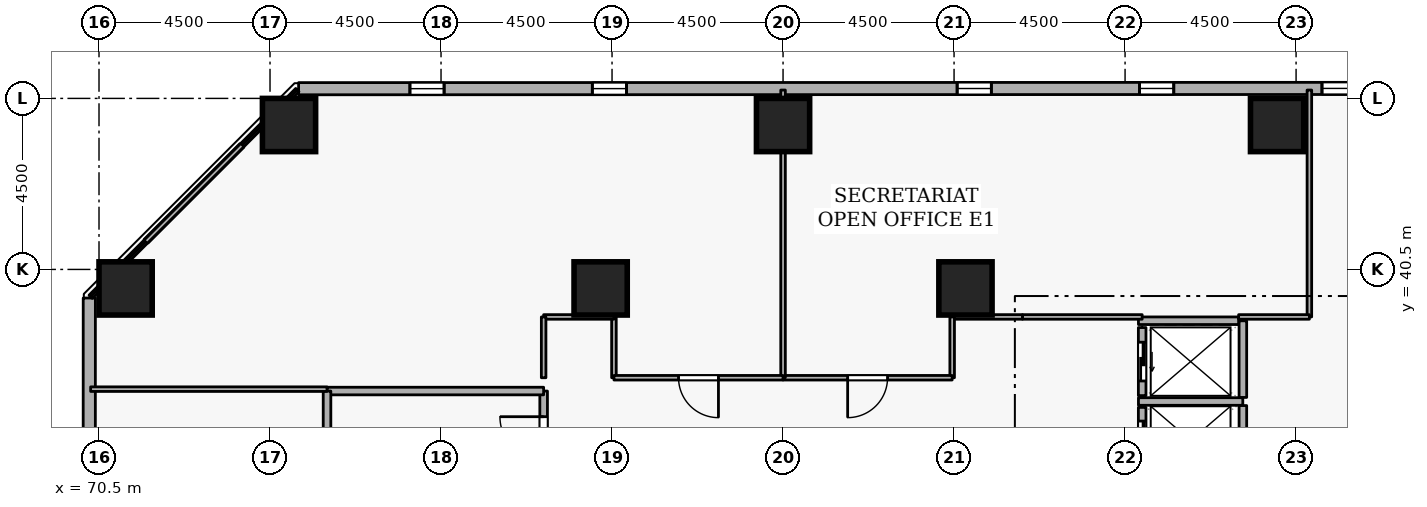
"""IFC4 building model, lengths in metres.
Left out: names, types, materials, properties, quantities, classifications, styles, units other than length and angle.
Written with IfcOpenShell. Run it as: python <this file> out.ifc"""

import sys

from ifc_helpers import new_model, si_unit, direction, frame, frame_2d, origin, origin_2d, place, context, subcontext, project, spatial, rectangle, extrude, element, fill, save


model = new_model("IFC4")
c1 = context("Model", 3, precision=1e-05, world=origin(), true_north=direction((0.0, 1.0)))
c2 = subcontext(c1, "Body", "Model", "MODEL_VIEW")
j1 = project(units=[si_unit("LENGTHUNIT", "METRE"), si_unit("PLANEANGLEUNIT", "RADIAN")], contexts=[c1])
p1 = place(None, origin())
s1 = spatial("IfcSite", under=j1, at=p1, CompositionType="ELEMENT")
p2 = place(p1, origin())
s2 = spatial("IfcBuilding", under=s1, at=p2, CompositionType="ELEMENT")
p3 = place(p2, frame((0.0, 0.0, 35.1)))
s3 = spatial("IfcBuildingStorey", under=s2, at=p3, CompositionType="ELEMENT", Elevation=35.1)
for number, where, z_axis, x_axis in (
    (1, (101.5, 44.3, 0.0), (0.0, 0.0, 1.0), (1.0, 0.0, 0.0)),
    (2, (88.5, 44.3, 0.0), (0.0, 0.0, 1.0), (1.0, 0.0, 0.0)),
    (3, (75.5, 44.3, 0.0), (0.0, 0.0, 1.0), (1.0, 0.0, 0.0)),
    (4, (71.2, 40.0, 0.0), (0.0, 0.0, 1.0), (1.0, 0.0, 0.0)),
    (5, (93.3, 40.0, 0.0), (0.0, 0.0, 1.0), (1.0, 0.0, 0.0)),
    (6, (83.7, 40.0, 0.0), (0.0, 0.0, 1.0), (1.0, 0.0, 0.0)),
):
    element("IfcColumn", number, at=place(p3, frame(where, z_axis=z_axis, x_axis=x_axis)), inside=s3, PredefinedType="COLUMN", context=c2, shape_type="SweptSolid", body=[
        extrude(rectangle(XDim=1.4, YDim=1.4, at=origin_2d()), origin(), (0.0, 0.0, 1.0), 3.6),
    ])
p4 = place(p3, frame((110.181, 45.265, 0.0), z_axis=(0.0, 0.0, 1.0), x_axis=(-0.999999961759, -0.000276554545, 0.0)))
e7 = element("IfcWall", 7, at=p4, inside=s3, PredefinedType="STANDARD", context=c2, shape_type="SweptSolid", body=[
    extrude(rectangle(XDim=34.429, YDim=0.32, at=frame_2d((17.214, 0.0))), origin(), (0.0, 0.0, 1.0), 2.7),
])
p5 = place(p4, frame((1.8, 0.0, 0.72)))
e8 = element("IfcOpeningElement", 8, at=p5, cuts=e7, PredefinedType="OPENING", context=c2, shape_type="SweptSolid", body=[
    extrude(rectangle(XDim=0.9, YDim=1.75, at=frame_2d((0.45, 0.875))), frame((0.0, 0.17, 0.0), z_axis=(0.0, -1.0, 0.0), x_axis=(1.0, 0.0, 0.0)), (0.0, 0.0, 1.0), 0.34),
])
p6 = place(p4, frame((6.6, 0.0, 0.72)))
e9 = element("IfcOpeningElement", 9, at=p6, cuts=e7, PredefinedType="OPENING", context=c2, shape_type="SweptSolid", body=[
    extrude(rectangle(XDim=0.9, YDim=1.75, at=frame_2d((0.45, 0.875))), frame((0.0, 0.17, 0.0), z_axis=(0.0, -1.0, 0.0), x_axis=(1.0, 0.0, 0.0)), (0.0, 0.0, 1.0), 0.34),
])
p7 = place(p4, frame((11.4, 0.0, 0.72)))
e10 = element("IfcOpeningElement", 10, at=p7, cuts=e7, PredefinedType="OPENING", context=c2, shape_type="SweptSolid", body=[
    extrude(rectangle(XDim=0.9, YDim=1.75, at=frame_2d((0.45, 0.875))), frame((0.0, 0.17, 0.0), z_axis=(0.0, -1.0, 0.0), x_axis=(1.0, 0.0, 0.0)), (0.0, 0.0, 1.0), 0.34),
])
p8 = place(p4, frame((16.2, 0.0, 0.72)))
e11 = element("IfcOpeningElement", 11, at=p8, cuts=e7, PredefinedType="OPENING", context=c2, shape_type="SweptSolid", body=[
    extrude(rectangle(XDim=0.9, YDim=1.75, at=frame_2d((0.45, 0.875))), frame((0.0, 0.17, 0.0), z_axis=(0.0, -1.0, 0.0), x_axis=(1.0, 0.0, 0.0)), (0.0, 0.0, 1.0), 0.34),
])
p9 = place(p4, frame((25.8, 0.0, 0.72)))
e12 = element("IfcOpeningElement", 12, at=p9, cuts=e7, PredefinedType="OPENING", context=c2, shape_type="SweptSolid", body=[
    extrude(rectangle(XDim=0.9, YDim=1.75, at=frame_2d((0.45, 0.875))), frame((0.0, 0.17, 0.0), z_axis=(0.0, -1.0, 0.0), x_axis=(1.0, 0.0, 0.0)), (0.0, 0.0, 1.0), 0.34),
])
p10 = place(p4, frame((30.6, 0.0, 0.72)))
e13 = element("IfcOpeningElement", 13, at=p10, cuts=e7, PredefinedType="OPENING", context=c2, shape_type="SweptSolid", body=[
    extrude(rectangle(XDim=0.9, YDim=1.75, at=frame_2d((0.45, 0.875))), frame((0.0, 0.17, 0.0), z_axis=(0.0, -1.0, 0.0), x_axis=(1.0, 0.0, 0.0)), (0.0, 0.0, 1.0), 0.34),
])
p11 = place(p3, frame((70.245, 39.748, 0.0), z_axis=(0.0, 0.0, 1.0), x_axis=(-0.000276554545, -0.999999961759, 0.0)))
e14 = element("IfcWall", 14, at=p11, inside=s3, PredefinedType="STANDARD", context=c2, shape_type="SweptSolid", body=[
    extrude(rectangle(XDim=34.429, YDim=0.32, at=frame_2d((17.214, 0.0))), origin(), (0.0, 0.0, 1.0), 2.7),
])
p12 = place(p11, frame((6.6, 0.0, 0.72)))
e15 = element("IfcOpeningElement", 15, at=p12, cuts=e14, PredefinedType="OPENING", context=c2, shape_type="SweptSolid", body=[
    extrude(rectangle(XDim=0.9, YDim=1.75, at=frame_2d((0.45, 0.875))), frame((0.0, 0.17, 0.0), z_axis=(0.0, -1.0, 0.0), x_axis=(1.0, 0.0, 0.0)), (0.0, 0.0, 1.0), 0.34),
])
p13 = place(p11, frame((16.2, 0.0, 0.72)))
e16 = element("IfcOpeningElement", 16, at=p13, cuts=e14, PredefinedType="OPENING", context=c2, shape_type="SweptSolid", body=[
    extrude(rectangle(XDim=0.9, YDim=1.75, at=frame_2d((0.45, 0.875))), frame((0.0, 0.17, 0.0), z_axis=(0.0, -1.0, 0.0), x_axis=(1.0, 0.0, 0.0)), (0.0, 0.0, 1.0), 0.34),
])
p14 = place(p11, frame((21.0, 0.0, 0.72)))
e17 = element("IfcOpeningElement", 17, at=p14, cuts=e14, PredefinedType="OPENING", context=c2, shape_type="SweptSolid", body=[
    extrude(rectangle(XDim=0.9, YDim=1.75, at=frame_2d((0.45, 0.875))), frame((0.0, 0.17, 0.0), z_axis=(0.0, -1.0, 0.0), x_axis=(1.0, 0.0, 0.0)), (0.0, 0.0, 1.0), 0.34),
])
p15 = place(p11, frame((30.6, 0.0, 0.72)))
e18 = element("IfcOpeningElement", 18, at=p15, cuts=e14, PredefinedType="OPENING", context=c2, shape_type="SweptSolid", body=[
    extrude(rectangle(XDim=0.9, YDim=1.75, at=frame_2d((0.45, 0.875))), frame((0.0, 0.17, 0.0), z_axis=(0.0, -1.0, 0.0), x_axis=(1.0, 0.0, 0.0)), (0.0, 0.0, 1.0), 0.34),
])
p16 = place(p3, frame((97.95, 36.87, 0.0), z_axis=(0.0, 0.0, 1.0), x_axis=(0.0, -1.0, 0.0)))
e19 = element("IfcWall", 19, at=p16, inside=s3, PredefinedType="STANDARD", context=c2, shape_type="SweptSolid", body=[
    extrude(rectangle(XDim=1.74, YDim=0.2, at=frame_2d((0.87, 0.0))), origin(), (0.0, 0.0, 1.0), 3.34),
])
p17 = place(p16, frame((0.36, 0.0, 0.0)))
e20 = element("IfcOpeningElement", 20, at=p17, cuts=e19, PredefinedType="OPENING", context=c2, shape_type="SweptSolid", body=[
    extrude(rectangle(XDim=1.02, YDim=2.06, at=frame_2d((0.51, 1.03))), frame((0.0, 0.11, 0.0), z_axis=(0.0, -1.0, 0.0), x_axis=(1.0, 0.0, 0.0)), (0.0, 0.0, 1.0), 0.22),
])
p18 = place(p3, frame((97.95, 38.97, 0.0), z_axis=(0.0, 0.0, 1.0), x_axis=(0.0, -1.0, 0.0)))
e21 = element("IfcWall", 21, at=p18, inside=s3, PredefinedType="STANDARD", context=c2, shape_type="SweptSolid", body=[
    extrude(rectangle(XDim=1.79, YDim=0.2, at=frame_2d((0.895, 0.0))), origin(), (0.0, 0.0, 1.0), 3.34),
])
p19 = place(p18, frame((0.385, 0.0, 0.0)))
e22 = element("IfcOpeningElement", 22, at=p19, cuts=e21, PredefinedType="OPENING", context=c2, shape_type="SweptSolid", body=[
    extrude(rectangle(XDim=1.02, YDim=2.06, at=frame_2d((0.51, 1.03))), frame((0.0, 0.11, 0.0), z_axis=(0.0, -1.0, 0.0), x_axis=(1.0, 0.0, 0.0)), (0.0, 0.0, 1.0), 0.22),
])
p20 = place(p3, frame((97.852, 37.025, 0.0), z_axis=(0.0, 0.0, 1.0), x_axis=(1.0, 0.0, 0.0)))
e23 = element("IfcWall", 23, at=p20, inside=s3, PredefinedType="STANDARD", context=c2, shape_type="SweptSolid", body=[
    extrude(rectangle(XDim=2.746, YDim=0.2, at=frame_2d((1.373, 0.0))), origin(), (0.0, 0.0, 1.0), 3.34),
])
p21 = place(p3, frame((100.6, 35.062, 0.0), z_axis=(0.0, 0.0, 1.0), x_axis=(0.0, 1.0, 0.0)))
e24 = element("IfcWall", 24, at=p21, inside=s3, PredefinedType="STANDARD", context=c2, shape_type="SweptSolid", body=[
    extrude(rectangle(XDim=1.856, YDim=0.2, at=frame_2d((0.928, 0.0))), origin(), (0.0, 0.0, 1.0), 3.34),
])
p22 = place(p3, frame((100.6, 37.132, 0.0), z_axis=(0.0, 0.0, 1.0), x_axis=(0.0, 1.0, 0.0)))
e25 = element("IfcWall", 25, at=p22, inside=s3, PredefinedType="STANDARD", context=c2, shape_type="SweptSolid", body=[
    extrude(rectangle(XDim=2.016, YDim=0.2, at=frame_2d((1.008, 0.0))), origin(), (0.0, 0.0, 1.0), 3.34),
])
p23 = place(p3, frame((97.852, 39.15, 0.0), z_axis=(0.0, 0.0, 1.0), x_axis=(1.0, 0.0, 0.0)))
e26 = element("IfcWall", 26, at=p23, inside=s3, PredefinedType="STANDARD", context=c2, shape_type="SweptSolid", body=[
    extrude(rectangle(XDim=2.636, YDim=0.2, at=frame_2d((1.318, 0.0))), origin(), (0.0, 0.0, 1.0), 3.34),
])
p24 = place(p3, frame((82.2, 34.8, 0.0), z_axis=(0.0, 0.0, 1.0), x_axis=(0.0, 1.0, 0.0)))
e27 = element("IfcWall", 27, at=p24, inside=s3, PredefinedType="STANDARD", context=c2, shape_type="SweptSolid", body=[
    extrude(rectangle(XDim=2.5, YDim=0.2, at=frame_2d((1.25, 0.0))), origin(), (0.0, 0.0, 1.0), 3.34),
])
p25 = place(p24, frame((0.675, 0.0, 0.0)))
e28 = element("IfcOpeningElement", 28, at=p25, cuts=e27, PredefinedType="OPENING", context=c2, shape_type="SweptSolid", body=[
    extrude(rectangle(XDim=1.15, YDim=2.1, at=frame_2d((0.575, 1.05))), frame((0.0, 0.11, 0.0), z_axis=(0.0, -1.0, 0.0), x_axis=(1.0, 0.0, 0.0)), (0.0, 0.0, 1.0), 0.22),
])
p26 = place(p3, frame((82.2, 37.3, 0.0), z_axis=(0.0, 0.0, 1.0), x_axis=(-1.0, 0.0, 0.0)))
e29 = element("IfcWall", 29, at=p26, inside=s3, PredefinedType="STANDARD", context=c2, shape_type="SweptSolid", body=[
    extrude(rectangle(XDim=5.7, YDim=0.2, at=frame_2d((2.85, 0.0))), origin(), (0.0, 0.0, 1.0), 3.34),
])
p27 = place(p3, frame((76.5, 37.3, 0.0), z_axis=(0.0, 0.0, 1.0), x_axis=(0.0, -1.0, 0.0)))
e30 = element("IfcWall", 30, at=p27, inside=s3, PredefinedType="STANDARD", context=c2, shape_type="SweptSolid", body=[
    extrude(rectangle(XDim=2.5, YDim=0.2, at=frame_2d((1.25, 0.0))), origin(), (0.0, 0.0, 1.0), 3.34),
])
p28 = place(p3, frame((97.95, 39.25, 0.0), z_axis=(0.0, 0.0, 1.0), x_axis=(-1.0, 0.0, 0.0)))
e31 = element("IfcWall", 31, at=p28, inside=s3, PredefinedType="PARTITIONING", context=c2, shape_type="SweptSolid", body=[
    extrude(rectangle(XDim=3.15, YDim=0.12, at=frame_2d((1.575, 0.0))), origin(), (0.0, 0.0, 1.0), 3.34),
])
p29 = place(p3, frame((94.8, 39.25, 0.0), z_axis=(0.0, 0.0, 1.0), x_axis=(-1.0, 0.0, 0.0)))
e32 = element("IfcWall", 32, at=p29, inside=s3, PredefinedType="PARTITIONING", context=c2, shape_type="SweptSolid", body=[
    extrude(rectangle(XDim=1.85, YDim=0.12, at=frame_2d((0.925, 0.0))), origin(), (0.0, 0.0, 1.0), 3.34),
])
p30 = place(p3, frame((92.95, 39.25, 0.0), z_axis=(0.0, 0.0, 1.0), x_axis=(0.0, -1.0, 0.0)))
e33 = element("IfcWall", 33, at=p30, inside=s3, PredefinedType="PARTITIONING", context=c2, shape_type="SweptSolid", body=[
    extrude(rectangle(XDim=1.6, YDim=0.12, at=frame_2d((0.8, 0.0))), origin(), (0.0, 0.0, 1.0), 3.34),
])
p31 = place(p3, frame((92.95, 37.65, 0.0), z_axis=(0.0, 0.0, 1.0), x_axis=(-1.0, 0.0, 0.0)))
e34 = element("IfcWall", 34, at=p31, inside=s3, PredefinedType="PARTITIONING", context=c2, shape_type="SweptSolid", body=[
    extrude(rectangle(XDim=4.45, YDim=0.12, at=frame_2d((2.225, 0.0))), origin(), (0.0, 0.0, 1.0), 3.34),
])
p32 = place(p31, frame((1.7, 0.0, 0.0)))
e35 = element("IfcOpeningElement", 35, at=p32, cuts=e34, PredefinedType="OPENING", context=c2, shape_type="SweptSolid", body=[
    extrude(rectangle(XDim=1.05, YDim=2.1, at=frame_2d((0.525, 1.05))), frame((0.0, 0.07, 0.0), z_axis=(0.0, -1.0, 0.0), x_axis=(1.0, 0.0, 0.0)), (0.0, 0.0, 1.0), 0.14),
])
p33 = place(p3, frame((88.5, 37.65, 0.0), z_axis=(0.0, 0.0, 1.0), x_axis=(0.0, 1.0, 0.0)))
e36 = element("IfcWall", 36, at=p33, inside=s3, PredefinedType="PARTITIONING", context=c2, shape_type="SweptSolid", body=[
    extrude(rectangle(XDim=7.57, YDim=0.12, at=frame_2d((3.785, 0.0))), origin(), (0.0, 0.0, 1.0), 2.878),
])
p34 = place(p3, frame((102.35, 45.22, 0.0), z_axis=(0.0, 0.0, 1.0), x_axis=(0.0, -1.0, 0.0)))
e37 = element("IfcWall", 37, at=p34, inside=s3, PredefinedType="PARTITIONING", context=c2, shape_type="SweptSolid", body=[
    extrude(rectangle(XDim=5.97, YDim=0.12, at=frame_2d((2.985, 0.0))), origin(), (0.0, 0.0, 1.0), 3.34),
])
p35 = place(p3, frame((102.35, 39.25, 0.0), z_axis=(0.0, 0.0, 1.0), x_axis=(-1.0, 0.0, 0.0)))
e38 = element("IfcWall", 38, at=p35, inside=s3, PredefinedType="PARTITIONING", context=c2, shape_type="SweptSolid", body=[
    extrude(rectangle(XDim=1.862, YDim=0.12, at=frame_2d((0.931, 0.0))), origin(), (0.0, 0.0, 1.0), 3.34),
])
p36 = place(p3, frame((84.05, 37.65, 0.0), z_axis=(0.0, 0.0, 1.0), x_axis=(0.0, 1.0, 0.0)))
e39 = element("IfcWall", 39, at=p36, inside=s3, PredefinedType="PARTITIONING", context=c2, shape_type="SweptSolid", body=[
    extrude(rectangle(XDim=1.6, YDim=0.12, at=frame_2d((0.8, 0.0))), origin(), (0.0, 0.0, 1.0), 3.34),
])
p37 = place(p3, frame((84.05, 39.25, 0.0), z_axis=(0.0, 0.0, 1.0), x_axis=(-1.0, 0.0, 0.0)))
e40 = element("IfcWall", 40, at=p37, inside=s3, PredefinedType="PARTITIONING", context=c2, shape_type="SweptSolid", body=[
    extrude(rectangle(XDim=1.85, YDim=0.12, at=frame_2d((0.925, 0.0))), origin(), (0.0, 0.0, 1.0), 3.34),
])
p38 = place(p3, frame((82.2, 39.25, 0.0), z_axis=(0.0, 0.0, 1.0), x_axis=(0.0, -1.0, 0.0)))
e41 = element("IfcWall", 41, at=p38, inside=s3, PredefinedType="PARTITIONING", context=c2, shape_type="SweptSolid", body=[
    extrude(rectangle(XDim=1.6, YDim=0.12, at=frame_2d((0.8, 0.0))), origin(), (0.0, 0.0, 1.0), 3.34),
])
p39 = place(p3, frame((76.5, 37.35, 0.0), z_axis=(0.0, 0.0, 1.0), x_axis=(-1.0, 0.0, 0.0)))
e42 = element("IfcWall", 42, at=p39, inside=s3, PredefinedType="PARTITIONING", context=c2, shape_type="SweptSolid", body=[
    extrude(rectangle(XDim=6.22, YDim=0.12, at=frame_2d((3.11, 0.0))), origin(), (0.0, 0.0, 1.0), 3.34),
])
p40 = place(p3, frame((70.28, 39.781, 0.0), z_axis=(0.0, 0.0, 1.0), x_axis=(0.707106781187, 0.707106781187, 0.0)))
e43 = element("IfcWall", 43, at=p40, inside=s3, PredefinedType="PARTITIONING", context=c2, shape_type="SweptSolid", body=[
    extrude(rectangle(XDim=7.693, YDim=0.12, at=frame_2d((3.846, 0.0))), origin(), (0.0, 0.0, 1.0), 3.34),
])
p41 = place(p3, frame((88.5, 37.65, 0.0), z_axis=(0.0, 0.0, 1.0), x_axis=(-1.0, 0.0, 0.0)))
e44 = element("IfcWall", 44, at=p41, inside=s3, PredefinedType="PARTITIONING", context=c2, shape_type="SweptSolid", body=[
    extrude(rectangle(XDim=4.45, YDim=0.12, at=frame_2d((2.225, 0.0))), origin(), (0.0, 0.0, 1.0), 3.34),
])
p42 = place(p41, frame((1.7, 0.0, 0.0)))
e45 = element("IfcOpeningElement", 45, at=p42, cuts=e44, PredefinedType="OPENING", context=c2, shape_type="SweptSolid", body=[
    extrude(rectangle(XDim=1.05, YDim=2.1, at=frame_2d((0.525, 1.05))), frame((0.0, 0.07, 0.0), z_axis=(0.0, -1.0, 0.0), x_axis=(1.0, 0.0, 0.0)), (0.0, 0.0, 1.0), 0.14),
])
p43 = place(p6, origin())
e46 = element("IfcWindow", 46, at=p43, inside=s3, PartitioningType="SINGLE_PANEL", PredefinedType="WINDOW", context=c2, shape_type="SweptSolid", body=[
    extrude(rectangle(XDim=0.9, YDim=1.75, at=frame_2d((0.45, 0.875))), frame((0.0, 0.03, 0.0), z_axis=(0.0, -1.0, 0.0), x_axis=(1.0, 0.0, 0.0)), (0.0, 0.0, 1.0), 0.06),
])
fill(e9, e46)
p44 = place(p7, origin())
e47 = element("IfcWindow", 47, at=p44, inside=s3, PartitioningType="SINGLE_PANEL", PredefinedType="WINDOW", context=c2, shape_type="SweptSolid", body=[
    extrude(rectangle(XDim=0.9, YDim=1.75, at=frame_2d((0.45, 0.875))), frame((0.0, 0.03, 0.0), z_axis=(0.0, -1.0, 0.0), x_axis=(1.0, 0.0, 0.0)), (0.0, 0.0, 1.0), 0.06),
])
fill(e10, e47)
p45 = place(p8, origin())
e48 = element("IfcWindow", 48, at=p45, inside=s3, PartitioningType="SINGLE_PANEL", PredefinedType="WINDOW", context=c2, shape_type="SweptSolid", body=[
    extrude(rectangle(XDim=0.9, YDim=1.75, at=frame_2d((0.45, 0.875))), frame((0.0, 0.03, 0.0), z_axis=(0.0, -1.0, 0.0), x_axis=(1.0, 0.0, 0.0)), (0.0, 0.0, 1.0), 0.06),
])
fill(e11, e48)
p46 = place(p9, origin())
e49 = element("IfcWindow", 49, at=p46, inside=s3, PartitioningType="SINGLE_PANEL", PredefinedType="WINDOW", context=c2, shape_type="SweptSolid", body=[
    extrude(rectangle(XDim=0.9, YDim=1.75, at=frame_2d((0.45, 0.875))), frame((0.0, 0.03, 0.0), z_axis=(0.0, -1.0, 0.0), x_axis=(1.0, 0.0, 0.0)), (0.0, 0.0, 1.0), 0.06),
])
fill(e12, e49)
p47 = place(p10, origin())
e50 = element("IfcWindow", 50, at=p47, inside=s3, PartitioningType="SINGLE_PANEL", PredefinedType="WINDOW", context=c2, shape_type="SweptSolid", body=[
    extrude(rectangle(XDim=0.9, YDim=1.75, at=frame_2d((0.45, 0.875))), frame((0.0, 0.03, 0.0), z_axis=(0.0, -1.0, 0.0), x_axis=(1.0, 0.0, 0.0)), (0.0, 0.0, 1.0), 0.06),
])
fill(e13, e50)
p48 = place(p17, origin())
e51 = element("IfcDoor", 51, at=p48, inside=s3, OperationType="SLIDING_TO_LEFT", PredefinedType="DOOR", context=c2, shape_type="SweptSolid", body=[
    extrude(rectangle(XDim=1.02, YDim=2.06, at=frame_2d((0.51, 1.03))), frame((0.0, 0.025, 0.0), z_axis=(0.0, -1.0, 0.0), x_axis=(1.0, 0.0, 0.0)), (0.0, 0.0, 1.0), 0.05),
])
fill(e20, e51)
p49 = place(p19, origin())
e52 = element("IfcDoor", 52, at=p49, inside=s3, OperationType="SLIDING_TO_LEFT", PredefinedType="DOOR", context=c2, shape_type="SweptSolid", body=[
    extrude(rectangle(XDim=1.02, YDim=2.06, at=frame_2d((0.51, 1.03))), frame((0.0, 0.025, 0.0), z_axis=(0.0, -1.0, 0.0), x_axis=(1.0, 0.0, 0.0)), (0.0, 0.0, 1.0), 0.05),
])
fill(e22, e52)
p50 = place(p25, origin())
e53 = element("IfcDoor", 53, at=p50, inside=s3, OperationType="SINGLE_SWING_RIGHT", PredefinedType="DOOR", context=c2, shape_type="SweptSolid", body=[
    extrude(rectangle(XDim=1.15, YDim=2.1, at=frame_2d((0.575, 1.05))), frame((0.0, 0.025, 0.0), z_axis=(0.0, -1.0, 0.0), x_axis=(1.0, 0.0, 0.0)), (0.0, 0.0, 1.0), 0.05),
])
fill(e28, e53)
p51 = place(p32, origin())
e54 = element("IfcDoor", 54, at=p51, inside=s3, OperationType="SINGLE_SWING_RIGHT", PredefinedType="DOOR", context=c2, shape_type="SweptSolid", body=[
    extrude(rectangle(XDim=1.05, YDim=2.1, at=frame_2d((0.525, 1.05))), frame((0.0, 0.025, 0.0), z_axis=(0.0, -1.0, 0.0), x_axis=(1.0, 0.0, 0.0)), (0.0, 0.0, 1.0), 0.05),
])
fill(e35, e54)
p52 = place(p42, origin())
e55 = element("IfcDoor", 55, at=p52, inside=s3, OperationType="SINGLE_SWING_LEFT", PredefinedType="DOOR", context=c2, shape_type="SweptSolid", body=[
    extrude(rectangle(XDim=1.05, YDim=2.1, at=frame_2d((0.525, 1.05))), frame((0.0, 0.025, 0.0), z_axis=(0.0, -1.0, 0.0), x_axis=(1.0, 0.0, 0.0)), (0.0, 0.0, 1.0), 0.05),
])
fill(e45, e55)
save(model, sys.argv[1])
